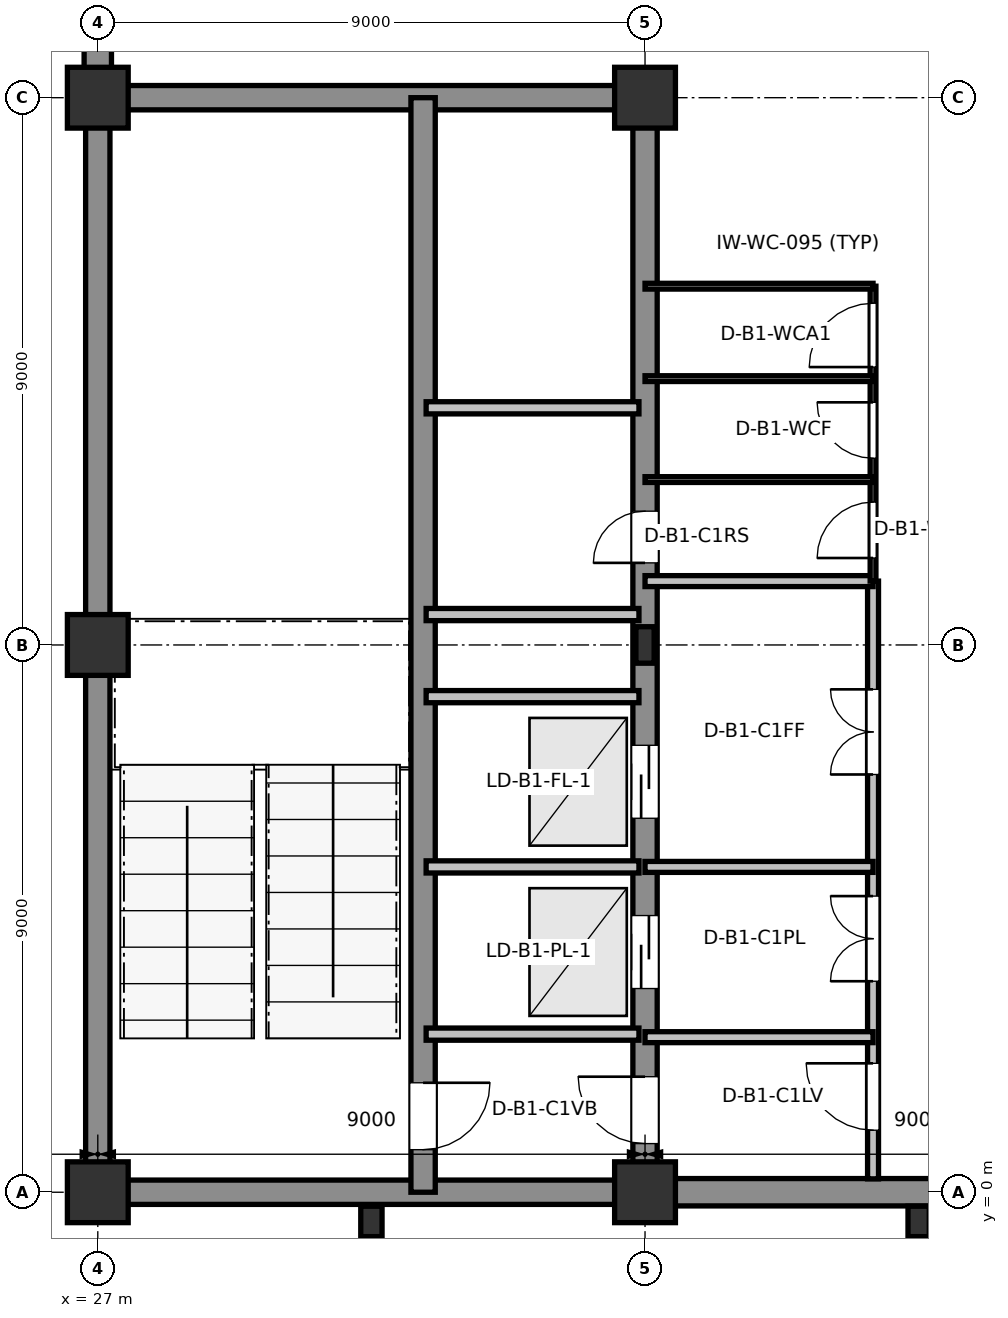
"""IFC4 building model, lengths in metres.
Left out: names, types, materials, properties, quantities, classifications, styles, units other than length and angle.
Written with IfcOpenShell. Run it as: python <this file> out.ifc"""

import sys

from ifc_helpers import new_model, si_unit, direction, frame, frame_2d, origin, origin_2d, place, context, subcontext, project, spatial, rectangle, i_section, extrude, element, fill, save


model = new_model("IFC4")
c1 = context("Model", 3, precision=1e-05, world=origin(), true_north=direction((0.0, 1.0)))
c2 = subcontext(c1, "Body", "Model", "MODEL_VIEW")
j1 = project(units=[si_unit("LENGTHUNIT", "METRE"), si_unit("PLANEANGLEUNIT", "RADIAN")], contexts=[c1])
p1 = place(None, origin())
s1 = spatial("IfcSite", under=j1, at=p1, CompositionType="ELEMENT")
p2 = place(p1, origin())
s2 = spatial("IfcBuilding", under=s1, at=p2, CompositionType="ELEMENT")
p3 = place(p2, frame((0.0, 0.0, -4.8)))
s3 = spatial("IfcBuildingStorey", under=s2, at=p3, CompositionType="ELEMENT", Elevation=-4.8)
for number, where, z_axis, x_axis in (
    (1, (31.5, -0.48, 0.0), (0.0, 0.0, 1.0), (1.0, 0.0, 0.0)),
    (2, (40.5, -0.48, 0.0), (0.0, 0.0, 1.0), (1.0, 0.0, 0.0)),
):
    element("IfcColumn", number, at=place(p3, frame(where, z_axis=z_axis, x_axis=x_axis)), inside=s3, PredefinedType="PILASTER", context=c2, shape_type="SweptSolid", body=[
        extrude(rectangle(XDim=0.35, YDim=0.5, at=origin_2d()), origin(), (0.0, 0.0, 1.0), 4.8),
    ])
for number, where, z_axis, x_axis in (
    (3, (27.0, 0.0, 0.0), (0.0, 0.0, 1.0), (1.0, 0.0, 0.0)),
    (4, (27.0, 9.0, 0.0), (0.0, 0.0, 1.0), (1.0, 0.0, 0.0)),
    (5, (27.0, 18.0, 0.0), (0.0, 0.0, 1.0), (1.0, 0.0, 0.0)),
    (6, (36.0, 0.0, 0.0), (0.0, 0.0, 1.0), (1.0, 0.0, 0.0)),
):
    element("IfcColumn", number, at=place(p3, frame(where, z_axis=z_axis, x_axis=x_axis)), inside=s3, PredefinedType="COLUMN", context=c2, shape_type="SweptSolid", body=[
        extrude(rectangle(XDim=1.0, YDim=1.0, at=origin_2d()), origin(), (0.0, 0.0, 1.0), 4.8),
    ])
p4 = place(p3, frame((36.0, 9.0, 0.0), z_axis=(0.0, 0.0, 1.0), x_axis=(1.0, 0.0, 0.0)))
e7 = element("IfcColumn", 7, at=p4, inside=s3, PredefinedType="COLUMN", context=c2, shape_type="SweptSolid", body=[
    extrude(i_section(OverallWidth=0.3, OverallDepth=0.6, WebThickness=0.015, FlangeThickness=0.03, at=origin_2d()), origin(), (0.0, 0.0, 1.0), 4.8),
])
p5 = place(p3, frame((36.0, 18.0, 0.0), z_axis=(0.0, 0.0, 1.0), x_axis=(1.0, 0.0, 0.0)))
e8 = element("IfcColumn", 8, at=p5, inside=s3, PredefinedType="COLUMN", context=c2, shape_type="SweptSolid", body=[
    extrude(rectangle(XDim=1.0, YDim=1.0, at=origin_2d()), origin(), (0.0, 0.0, 1.0), 4.8),
])
p6 = place(p3, frame((27.0, 21.0, 0.0), z_axis=(0.0, 0.0, 1.0), x_axis=(0.0, -1.0, 0.0)))
e9 = element("IfcWall", 9, at=p6, inside=s3, PredefinedType="USERDEFINED", context=c2, shape_type="SweptSolid", body=[
    extrude(rectangle(XDim=3.0, YDim=0.45, at=frame_2d((1.5, 0.0))), origin(), (0.0, 0.0, 1.0), 4.55),
])
p7 = place(p3, frame((36.0, 0.0, 0.0), z_axis=(0.0, 0.0, 1.0), x_axis=(1.0, 0.0, 0.0)))
e10 = element("IfcWall", 10, at=p7, inside=s3, PredefinedType="USERDEFINED", context=c2, shape_type="SweptSolid", body=[
    extrude(rectangle(XDim=9.0, YDim=0.45, at=frame_2d((4.5, 0.0))), origin(), (0.0, 0.0, 1.0), 4.55),
])
p8 = place(p3, frame((27.0, 0.0, 0.0), z_axis=(0.0, 0.0, 1.0), x_axis=(1.0, 0.0, 0.0)))
e11 = element("IfcWall", 11, at=p8, inside=s3, PredefinedType="SHEAR", context=c2, shape_type="SweptSolid", body=[
    extrude(rectangle(XDim=9.0, YDim=0.4, at=frame_2d((4.5, 0.0))), origin(), (0.0, 0.0, 1.0), 4.55),
])
p9 = place(p3, frame((36.0, 0.0, 0.0), z_axis=(0.0, 0.0, 1.0), x_axis=(0.0, 1.0, 0.0)))
e12 = element("IfcWall", 12, at=p9, inside=s3, PredefinedType="SHEAR", context=c2, shape_type="SweptSolid", body=[
    extrude(rectangle(XDim=18.0, YDim=0.4, at=frame_2d((9.0, 0.0))), origin(), (0.0, 0.0, 1.0), 4.55),
])
p10 = place(p9, frame((0.8, 0.0, 0.0)))
e13 = element("IfcOpeningElement", 13, at=p10, cuts=e12, PredefinedType="OPENING", context=c2, shape_type="SweptSolid", body=[
    extrude(rectangle(XDim=1.1, YDim=2.16, at=frame_2d((0.55, 1.08))), frame((0.0, 0.21, 0.0), z_axis=(0.0, -1.0, 0.0), x_axis=(1.0, 0.0, 0.0)), (0.0, 0.0, 1.0), 0.42),
])
p11 = place(p9, frame((3.35, 0.0, 0.0)))
e14 = element("IfcOpeningElement", 14, at=p11, cuts=e12, PredefinedType="OPENING", context=c2, shape_type="SweptSolid", body=[
    extrude(rectangle(XDim=1.2, YDim=2.2, at=frame_2d((0.6, 1.1))), frame((0.0, 0.21, 0.0), z_axis=(0.0, -1.0, 0.0), x_axis=(1.0, 0.0, 0.0)), (0.0, 0.0, 1.0), 0.42),
])
p12 = place(p9, frame((6.15, 0.0, 0.0)))
e15 = element("IfcOpeningElement", 15, at=p12, cuts=e12, PredefinedType="OPENING", context=c2, shape_type="SweptSolid", body=[
    extrude(rectangle(XDim=1.2, YDim=2.2, at=frame_2d((0.6, 1.1))), frame((0.0, 0.21, 0.0), z_axis=(0.0, -1.0, 0.0), x_axis=(1.0, 0.0, 0.0)), (0.0, 0.0, 1.0), 0.42),
])
p13 = place(p9, frame((10.35, 0.0, 0.0)))
e16 = element("IfcOpeningElement", 16, at=p13, cuts=e12, PredefinedType="OPENING", context=c2, shape_type="SweptSolid", body=[
    extrude(rectangle(XDim=0.85, YDim=2.1, at=frame_2d((0.425, 1.05))), frame((0.0, 0.21, 0.0), z_axis=(0.0, -1.0, 0.0), x_axis=(1.0, 0.0, 0.0)), (0.0, 0.0, 1.0), 0.42),
])
p14 = place(p3, frame((36.0, 18.0, 0.0), z_axis=(0.0, 0.0, 1.0), x_axis=(-1.0, 0.0, 0.0)))
e17 = element("IfcWall", 17, at=p14, inside=s3, PredefinedType="SHEAR", context=c2, shape_type="SweptSolid", body=[
    extrude(rectangle(XDim=9.0, YDim=0.4, at=frame_2d((4.5, 0.0))), origin(), (0.0, 0.0, 1.0), 4.55),
])
p15 = place(p3, frame((27.0, 18.0, 0.0), z_axis=(0.0, 0.0, 1.0), x_axis=(0.0, -1.0, 0.0)))
e18 = element("IfcWall", 18, at=p15, inside=s3, PredefinedType="SHEAR", context=c2, shape_type="SweptSolid", body=[
    extrude(rectangle(XDim=18.0, YDim=0.4, at=frame_2d((9.0, 0.0))), origin(), (0.0, 0.0, 1.0), 4.55),
])
p16 = place(p3, frame((32.35, 0.0, 0.0), z_axis=(0.0, 0.0, 1.0), x_axis=(0.0, 1.0, 0.0)))
e19 = element("IfcWall", 19, at=p16, inside=s3, PredefinedType="SHEAR", context=c2, shape_type="SweptSolid", body=[
    extrude(rectangle(XDim=18.0, YDim=0.4, at=frame_2d((9.0, 0.0))), origin(), (0.0, 0.0, 1.0), 4.55),
])
p17 = place(p16, frame((0.7, 0.0, 0.0)))
e20 = element("IfcOpeningElement", 20, at=p17, cuts=e19, PredefinedType="OPENING", context=c2, shape_type="SweptSolid", body=[
    extrude(rectangle(XDim=1.1, YDim=2.16, at=frame_2d((0.55, 1.08))), frame((0.0, 0.21, 0.0), z_axis=(0.0, -1.0, 0.0), x_axis=(1.0, 0.0, 0.0)), (0.0, 0.0, 1.0), 0.42),
])
for number, where, z_axis, x_axis in (
    (21, (32.4, 2.6, 0.0), (0.0, 0.0, 1.0), (1.0, 0.0, 0.0)),
    (22, (32.4, 5.35, 0.0), (0.0, 0.0, 1.0), (1.0, 0.0, 0.0)),
    (23, (32.4, 8.15, 0.0), (0.0, 0.0, 1.0), (1.0, 0.0, 0.0)),
    (24, (32.4, 9.5, 0.0), (0.0, 0.0, 1.0), (1.0, 0.0, 0.0)),
    (25, (32.4, 12.9, 0.0), (0.0, 0.0, 1.0), (1.0, 0.0, 0.0)),
):
    element("IfcWall", number, at=place(p3, frame(where, z_axis=z_axis, x_axis=x_axis)), inside=s3, PredefinedType="PARTITIONING", context=c2, shape_type="SweptSolid", body=[
        extrude(rectangle(XDim=3.5, YDim=0.2, at=frame_2d((1.75, 0.0))), origin(), (0.0, 0.0, 1.0), 4.55),
    ])
p18 = place(p3, frame((39.75, 0.22, 0.0), z_axis=(0.0, 0.0, 1.0), x_axis=(0.0, 1.0, 0.0)))
e26 = element("IfcWall", 26, at=p18, inside=s3, PredefinedType="PARTITIONING", context=c2, shape_type="SweptSolid", body=[
    extrude(rectangle(XDim=9.83, YDim=0.18, at=frame_2d((4.915, 0.0))), origin(), (0.0, 0.0, 1.0), 4.55),
])
p19 = place(p18, frame((0.8, 0.0, 0.0)))
e27 = element("IfcOpeningElement", 27, at=p19, cuts=e26, PredefinedType="OPENING", context=c2, shape_type="SweptSolid", body=[
    extrude(rectangle(XDim=1.1, YDim=2.16, at=frame_2d((0.55, 1.08))), frame((0.0, 0.1, 0.0), z_axis=(0.0, -1.0, 0.0), x_axis=(1.0, 0.0, 0.0)), (0.0, 0.0, 1.0), 0.2),
])
p20 = place(p18, frame((3.25, 0.0, 0.0)))
e28 = element("IfcOpeningElement", 28, at=p20, cuts=e26, PredefinedType="OPENING", context=c2, shape_type="SweptSolid", body=[
    extrude(rectangle(XDim=1.4, YDim=2.2, at=frame_2d((0.7, 1.1))), frame((0.0, 0.1, 0.0), z_axis=(0.0, -1.0, 0.0), x_axis=(1.0, 0.0, 0.0)), (0.0, 0.0, 1.0), 0.2),
])
p21 = place(p18, frame((6.65, 0.0, 0.0)))
e29 = element("IfcOpeningElement", 29, at=p21, cuts=e26, PredefinedType="OPENING", context=c2, shape_type="SweptSolid", body=[
    extrude(rectangle(XDim=1.4, YDim=2.2, at=frame_2d((0.7, 1.1))), frame((0.0, 0.1, 0.0), z_axis=(0.0, -1.0, 0.0), x_axis=(1.0, 0.0, 0.0)), (0.0, 0.0, 1.0), 0.2),
])
for number, where, z_axis, x_axis in (
    (30, (36.0, 2.55, 0.0), (0.0, 0.0, 1.0), (1.0, 0.0, 0.0)),
    (31, (36.0, 5.35, 0.0), (0.0, 0.0, 1.0), (1.0, 0.0, 0.0)),
    (32, (36.0, 10.05, 0.0), (0.0, 0.0, 1.0), (1.0, 0.0, 0.0)),
):
    element("IfcWall", number, at=place(p3, frame(where, z_axis=z_axis, x_axis=x_axis)), inside=s3, PredefinedType="PARTITIONING", context=c2, shape_type="SweptSolid", body=[
        extrude(rectangle(XDim=3.75, YDim=0.18, at=frame_2d((1.875, 0.0))), origin(), (0.0, 0.0, 1.0), 4.55),
    ])
p22 = place(p3, frame((39.75, 10.05, 0.0), z_axis=(0.0, 0.0, 1.0), x_axis=(0.0, 1.0, 0.0)))
e33 = element("IfcWall", 33, at=p22, inside=s3, PredefinedType="PARTITIONING", context=c2, shape_type="SweptSolid", body=[
    extrude(rectangle(XDim=4.85, YDim=0.095, at=frame_2d((2.425, 0.0))), origin(), (0.0, 0.0, 1.0), 4.55),
])
p23 = place(p22, frame((0.38, 0.0, 0.0)))
e34 = element("IfcOpeningElement", 34, at=p23, cuts=e33, PredefinedType="OPENING", context=c2, shape_type="SweptSolid", body=[
    extrude(rectangle(XDim=0.92, YDim=2.1, at=frame_2d((0.46, 1.05))), frame((0.0, 0.057, 0.0), z_axis=(0.0, -1.0, 0.0), x_axis=(1.0, 0.0, 0.0)), (0.0, 0.0, 1.0), 0.115),
])
p24 = place(p22, frame((2.02, 0.0, 0.0)))
e35 = element("IfcOpeningElement", 35, at=p24, cuts=e33, PredefinedType="OPENING", context=c2, shape_type="SweptSolid", body=[
    extrude(rectangle(XDim=0.92, YDim=2.1, at=frame_2d((0.46, 1.05))), frame((0.0, 0.057, 0.0), z_axis=(0.0, -1.0, 0.0), x_axis=(1.0, 0.0, 0.0)), (0.0, 0.0, 1.0), 0.115),
])
p25 = place(p22, frame((3.52, 0.0, 0.0)))
e36 = element("IfcOpeningElement", 36, at=p25, cuts=e33, PredefinedType="OPENING", context=c2, shape_type="SweptSolid", body=[
    extrude(rectangle(XDim=1.05, YDim=2.13, at=frame_2d((0.525, 1.065))), frame((0.0, 0.057, 0.0), z_axis=(0.0, -1.0, 0.0), x_axis=(1.0, 0.0, 0.0)), (0.0, 0.0, 1.0), 0.115),
])
for number, where, z_axis, x_axis in (
    (37, (36.0, 11.72, 0.0), (0.0, 0.0, 1.0), (1.0, 0.0, 0.0)),
    (38, (36.0, 13.38, 0.0), (0.0, 0.0, 1.0), (1.0, 0.0, 0.0)),
):
    element("IfcWall", number, at=place(p3, frame(where, z_axis=z_axis, x_axis=x_axis)), inside=s3, PredefinedType="PARTITIONING", context=c2, shape_type="SweptSolid", body=[
        extrude(rectangle(XDim=3.75, YDim=0.095, at=frame_2d((1.875, 0.0))), origin(), (0.0, 0.0, 1.0), 4.55),
    ])
p26 = place(p3, frame((36.0, 14.9, 0.0), z_axis=(0.0, 0.0, 1.0), x_axis=(1.0, 0.0, 0.0)))
e39 = element("IfcWall", 39, at=p26, inside=s3, PredefinedType="PARTITIONING", context=c2, shape_type="SweptSolid", body=[
    extrude(rectangle(XDim=3.75, YDim=0.095, at=frame_2d((1.875, 0.0))), origin(), (0.0, 0.0, 1.0), 4.085),
])
p27 = place(p17, frame((1.1, 0.0, 0.0), z_axis=(0.0, 0.0, 1.0), x_axis=(-1.0, 0.0, 0.0)))
e40 = element("IfcDoor", 40, at=p27, inside=s3, OperationType="SINGLE_SWING_LEFT", PredefinedType="DOOR", context=c2, shape_type="SweptSolid", body=[
    extrude(rectangle(XDim=1.1, YDim=2.16, at=frame_2d((0.55, 1.08))), frame((0.0, 0.025, 0.0), z_axis=(0.0, -1.0, 0.0), x_axis=(1.0, 0.0, 0.0)), (0.0, 0.0, 1.0), 0.05),
])
fill(e20, e40)
p28 = place(p10, origin())
e41 = element("IfcDoor", 41, at=p28, inside=s3, OperationType="SINGLE_SWING_RIGHT", PredefinedType="DOOR", context=c2, shape_type="SweptSolid", body=[
    extrude(rectangle(XDim=1.1, YDim=2.16, at=frame_2d((0.55, 1.08))), frame((0.0, 0.025, 0.0), z_axis=(0.0, -1.0, 0.0), x_axis=(1.0, 0.0, 0.0)), (0.0, 0.0, 1.0), 0.05),
])
fill(e13, e41)
p29 = place(p11, origin())
e42 = element("IfcDoor", 42, at=p29, inside=s3, OperationType="SLIDING_TO_LEFT", PredefinedType="DOOR", context=c2, shape_type="SweptSolid", body=[
    extrude(rectangle(XDim=1.2, YDim=2.2, at=frame_2d((0.6, 1.1))), frame((0.0, 0.025, 0.0), z_axis=(0.0, -1.0, 0.0), x_axis=(1.0, 0.0, 0.0)), (0.0, 0.0, 1.0), 0.05),
])
fill(e14, e42)
p30 = place(p12, origin())
e43 = element("IfcDoor", 43, at=p30, inside=s3, OperationType="SLIDING_TO_LEFT", PredefinedType="DOOR", context=c2, shape_type="SweptSolid", body=[
    extrude(rectangle(XDim=1.2, YDim=2.2, at=frame_2d((0.6, 1.1))), frame((0.0, 0.025, 0.0), z_axis=(0.0, -1.0, 0.0), x_axis=(1.0, 0.0, 0.0)), (0.0, 0.0, 1.0), 0.05),
])
fill(e15, e43)
p31 = place(p13, origin())
e44 = element("IfcDoor", 44, at=p31, inside=s3, OperationType="SINGLE_SWING_LEFT", PredefinedType="DOOR", context=c2, shape_type="SweptSolid", body=[
    extrude(rectangle(XDim=0.85, YDim=2.1, at=frame_2d((0.425, 1.05))), frame((0.0, 0.025, 0.0), z_axis=(0.0, -1.0, 0.0), x_axis=(1.0, 0.0, 0.0)), (0.0, 0.0, 1.0), 0.05),
])
fill(e16, e44)
p32 = place(p19, origin())
e45 = element("IfcDoor", 45, at=p32, inside=s3, OperationType="SINGLE_SWING_RIGHT", PredefinedType="DOOR", context=c2, shape_type="SweptSolid", body=[
    extrude(rectangle(XDim=1.1, YDim=2.16, at=frame_2d((0.55, 1.08))), frame((0.0, 0.025, 0.0), z_axis=(0.0, -1.0, 0.0), x_axis=(1.0, 0.0, 0.0)), (0.0, 0.0, 1.0), 0.05),
])
fill(e27, e45)
p33 = place(p20, origin())
e46 = element("IfcDoor", 46, at=p33, inside=s3, OperationType="DOUBLE_DOOR_SINGLE_SWING", PredefinedType="DOOR", context=c2, shape_type="SweptSolid", body=[
    extrude(rectangle(XDim=1.4, YDim=2.2, at=frame_2d((0.7, 1.1))), frame((0.0, 0.025, 0.0), z_axis=(0.0, -1.0, 0.0), x_axis=(1.0, 0.0, 0.0)), (0.0, 0.0, 1.0), 0.05),
])
fill(e28, e46)
p34 = place(p21, origin())
e47 = element("IfcDoor", 47, at=p34, inside=s3, OperationType="DOUBLE_DOOR_SINGLE_SWING", PredefinedType="DOOR", context=c2, shape_type="SweptSolid", body=[
    extrude(rectangle(XDim=1.4, YDim=2.2, at=frame_2d((0.7, 1.1))), frame((0.0, 0.025, 0.0), z_axis=(0.0, -1.0, 0.0), x_axis=(1.0, 0.0, 0.0)), (0.0, 0.0, 1.0), 0.05),
])
fill(e29, e47)
p35 = place(p23, origin())
e48 = element("IfcDoor", 48, at=p35, inside=s3, OperationType="SINGLE_SWING_LEFT", PredefinedType="DOOR", context=c2, shape_type="SweptSolid", body=[
    extrude(rectangle(XDim=0.92, YDim=2.1, at=frame_2d((0.46, 1.05))), frame((0.0, 0.025, 0.0), z_axis=(0.0, -1.0, 0.0), x_axis=(1.0, 0.0, 0.0)), (0.0, 0.0, 1.0), 0.05),
])
fill(e34, e48)
p36 = place(p24, origin())
e49 = element("IfcDoor", 49, at=p36, inside=s3, OperationType="SINGLE_SWING_RIGHT", PredefinedType="DOOR", context=c2, shape_type="SweptSolid", body=[
    extrude(rectangle(XDim=0.92, YDim=2.1, at=frame_2d((0.46, 1.05))), frame((0.0, 0.025, 0.0), z_axis=(0.0, -1.0, 0.0), x_axis=(1.0, 0.0, 0.0)), (0.0, 0.0, 1.0), 0.05),
])
fill(e35, e49)
p37 = place(p25, origin())
e50 = element("IfcDoor", 50, at=p37, inside=s3, OperationType="SINGLE_SWING_LEFT", PredefinedType="DOOR", context=c2, shape_type="SweptSolid", body=[
    extrude(rectangle(XDim=1.05, YDim=2.13, at=frame_2d((0.525, 1.065))), frame((0.0, 0.025, 0.0), z_axis=(0.0, -1.0, 0.0), x_axis=(1.0, 0.0, 0.0)), (0.0, 0.0, 1.0), 0.05),
])
fill(e36, e50)
save(model, sys.argv[1])
